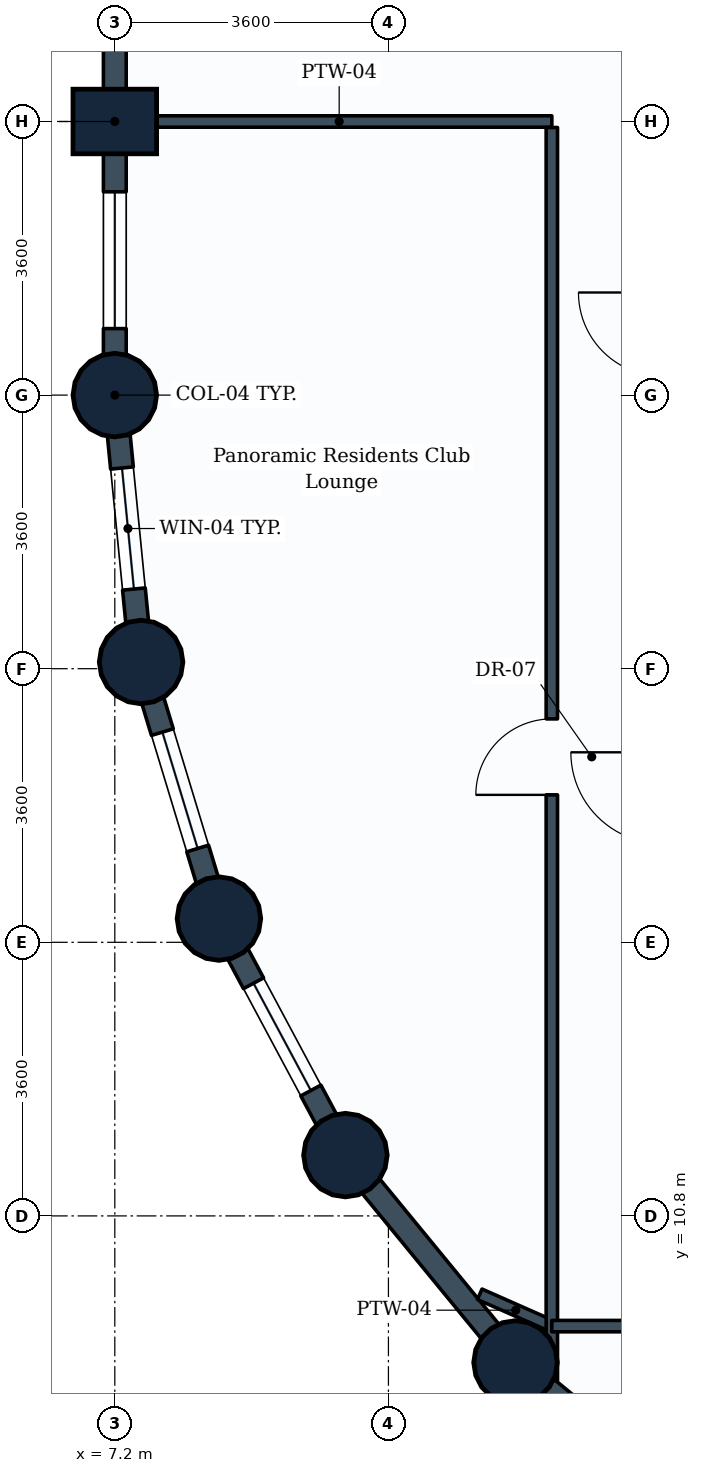
"""IFC4 building model, lengths in metres.
Left out: names, types, materials, properties, quantities, classifications, styles, units other than length and angle.
Written with IfcOpenShell. Run it as: python <this file> out.ifc"""

import sys

from ifc_helpers import new_model, si_unit, direction, frame, frame_2d, origin, origin_2d, place, context, subcontext, project, spatial, rectangle, circle, extrude, element, fill, save


model = new_model("IFC4")
c1 = context("Model", 3, precision=1e-05, world=origin(), true_north=direction((0.0, 1.0)))
c2 = subcontext(c1, "Body", "Model", "MODEL_VIEW")
j1 = project(units=[si_unit("LENGTHUNIT", "METRE"), si_unit("PLANEANGLEUNIT", "RADIAN")], contexts=[c1])
p1 = place(None, origin())
s1 = spatial("IfcSite", under=j1, at=p1, CompositionType="ELEMENT")
p2 = place(p1, origin())
s2 = spatial("IfcBuilding", under=s1, at=p2, CompositionType="ELEMENT")
p3 = place(p2, frame((0.0, 0.0, 80.1)))
s3 = spatial("IfcBuildingStorey", under=s2, at=p3, CompositionType="ELEMENT", Elevation=80.1)
p4 = place(p3, frame((7.2, 21.6, 0.0), z_axis=(0.0, 0.0, 1.0), x_axis=(1.0, 0.0, 0.0)))
e1 = element("IfcColumn", 1, at=p4, inside=s3, PredefinedType="COLUMN", context=c2, shape_type="SweptSolid", body=[
    extrude(circle(Radius=0.55, at=origin_2d()), origin(), (0.0, 0.0, 1.0), 3.9),
])
p5 = place(p3, frame((7.2, 25.2, 0.0), z_axis=(0.0, 0.0, 1.0), x_axis=(0.0, 1.0, 0.0)))
e2 = element("IfcColumn", 2, at=p5, inside=s3, PredefinedType="COLUMN", context=c2, shape_type="SweptSolid", body=[
    extrude(rectangle(XDim=0.85, YDim=1.1, at=origin_2d()), origin(), (0.0, 0.0, 1.0), 3.9),
])
for number, where, z_axis, x_axis in (
    (3, (7.546, 18.088, 0.0), (0.0, 0.0, 1.0), (1.0, 0.0, 0.0)),
    (4, (8.57, 14.712, 0.0), (0.0, 0.0, 1.0), (1.0, 0.0, 0.0)),
    (5, (10.234, 11.6, 0.0), (0.0, 0.0, 1.0), (1.0, 0.0, 0.0)),
    (6, (12.472, 8.872, 0.0), (0.0, 0.0, 1.0), (1.0, 0.0, 0.0)),
):
    element("IfcColumn", number, at=place(p3, frame(where, z_axis=z_axis, x_axis=x_axis)), inside=s3, PredefinedType="COLUMN", context=c2, shape_type="SweptSolid", body=[
        extrude(circle(Radius=0.55, at=origin_2d()), origin(), (0.0, 0.0, 1.0), 3.9),
    ])
p6 = place(p3, frame((7.2, 25.2, 0.0), z_axis=(0.0, 0.0, 1.0), x_axis=(0.0, 1.0, 0.0)))
e7 = element("IfcWall", 7, at=p6, inside=s3, PredefinedType="STANDARD", context=c2, shape_type="SweptSolid", body=[
    extrude(rectangle(XDim=3.6, YDim=0.3, at=frame_2d((1.8, 0.0))), origin(), (0.0, 0.0, 1.0), 2.93),
])
p7 = place(p3, frame((7.2, 21.6, 0.0), z_axis=(0.0, 0.0, 1.0), x_axis=(0.0, 1.0, 0.0)))
e8 = element("IfcWall", 8, at=p7, inside=s3, PredefinedType="STANDARD", context=c2, shape_type="SweptSolid", body=[
    extrude(rectangle(XDim=3.6, YDim=0.3, at=frame_2d((1.8, 0.0))), origin(), (0.0, 0.0, 1.0), 2.93),
])
p8 = place(p7, frame((0.875, 0.0, 0.85)))
e9 = element("IfcOpeningElement", 9, at=p8, cuts=e8, PredefinedType="OPENING", context=c2, shape_type="SweptSolid", body=[
    extrude(rectangle(XDim=1.8, YDim=1.35, at=frame_2d((0.9, 0.675))), frame((0.0, 0.16, 0.0), z_axis=(0.0, -1.0, 0.0), x_axis=(1.0, 0.0, 0.0)), (0.0, 0.0, 1.0), 0.32),
])
p9 = place(p3, frame((7.546, 18.088, 0.0), z_axis=(0.0, 0.0, 1.0), x_axis=(-0.09802417461, 0.995184033831, 0.0)))
e10 = element("IfcWall", 10, at=p9, inside=s3, PredefinedType="STANDARD", context=c2, shape_type="SweptSolid", body=[
    extrude(rectangle(XDim=3.529, YDim=0.3, at=frame_2d((1.765, 0.0))), origin(), (0.0, 0.0, 1.0), 2.93),
])
p10 = place(p9, frame((0.965, 0.0, 0.85)))
e11 = element("IfcOpeningElement", 11, at=p10, cuts=e10, PredefinedType="OPENING", context=c2, shape_type="SweptSolid", body=[
    extrude(rectangle(XDim=1.6, YDim=1.35, at=frame_2d((0.8, 0.675))), frame((0.0, 0.16, 0.0), z_axis=(0.0, -1.0, 0.0), x_axis=(1.0, 0.0, 0.0)), (0.0, 0.0, 1.0), 0.32),
])
p11 = place(p3, frame((8.57, 14.712, 0.0), z_axis=(0.0, 0.0, 1.0), x_axis=(-0.290305086481, 0.956934144423, 0.0)))
e12 = element("IfcWall", 12, at=p11, inside=s3, PredefinedType="STANDARD", context=c2, shape_type="SweptSolid", body=[
    extrude(rectangle(XDim=3.528, YDim=0.3, at=frame_2d((1.764, 0.0))), origin(), (0.0, 0.0, 1.0), 2.93),
])
p12 = place(p11, frame((0.964, 0.0, 0.85)))
e13 = element("IfcOpeningElement", 13, at=p12, cuts=e12, PredefinedType="OPENING", context=c2, shape_type="SweptSolid", body=[
    extrude(rectangle(XDim=1.6, YDim=1.35, at=frame_2d((0.8, 0.675))), frame((0.0, 0.16, 0.0), z_axis=(0.0, -1.0, 0.0), x_axis=(1.0, 0.0, 0.0)), (0.0, 0.0, 1.0), 0.32),
])
p13 = place(p3, frame((10.234, 11.6, 0.0), z_axis=(0.0, 0.0, 1.0), x_axis=(-0.47151087309, 0.881860247748, 0.0)))
e14 = element("IfcWall", 14, at=p13, inside=s3, PredefinedType="STANDARD", context=c2, shape_type="SweptSolid", body=[
    extrude(rectangle(XDim=3.529, YDim=0.3, at=frame_2d((1.764, 0.0))), origin(), (0.0, 0.0, 1.0), 2.93),
])
p14 = place(p13, frame((0.964, 0.0, 0.85)))
e15 = element("IfcOpeningElement", 15, at=p14, cuts=e14, PredefinedType="OPENING", context=c2, shape_type="SweptSolid", body=[
    extrude(rectangle(XDim=1.6, YDim=1.35, at=frame_2d((0.8, 0.675))), frame((0.0, 0.16, 0.0), z_axis=(0.0, -1.0, 0.0), x_axis=(1.0, 0.0, 0.0)), (0.0, 0.0, 1.0), 0.32),
])
p15 = place(p3, frame((12.472, 8.872, 0.0), z_axis=(0.0, 0.0, 1.0), x_axis=(-0.634258295121, 0.773121216285, 0.0)))
e16 = element("IfcWall", 16, at=p15, inside=s3, PredefinedType="STANDARD", context=c2, shape_type="SweptSolid", body=[
    extrude(rectangle(XDim=3.529, YDim=0.3, at=frame_2d((1.764, 0.0))), origin(), (0.0, 0.0, 1.0), 2.93),
])
p16 = place(p3, frame((15.2, 6.634, 0.0), z_axis=(0.0, 0.0, 1.0), x_axis=(-0.773121216285, 0.634258295121, 0.0)))
e17 = element("IfcWall", 17, at=p16, inside=s3, PredefinedType="STANDARD", context=c2, shape_type="SweptSolid", body=[
    extrude(rectangle(XDim=3.529, YDim=0.3, at=frame_2d((1.764, 0.0))), origin(), (0.0, 0.0, 1.0), 2.93),
])
p17 = place(p16, frame((0.964, 0.0, 0.85)))
e18 = element("IfcOpeningElement", 18, at=p17, cuts=e17, PredefinedType="OPENING", context=c2, shape_type="SweptSolid", body=[
    extrude(rectangle(XDim=1.6, YDim=1.35, at=frame_2d((0.8, 0.675))), frame((0.0, 0.16, 0.0), z_axis=(0.0, -1.0, 0.0), x_axis=(1.0, 0.0, 0.0)), (0.0, 0.0, 1.0), 0.32),
])
p18 = place(p3, frame((7.354, 25.2, 0.0), z_axis=(0.0, 0.0, 1.0), x_axis=(1.0, 0.0, 0.0)))
e19 = element("IfcWall", 19, at=p18, inside=s3, PredefinedType="PARTITIONING", context=c2, shape_type="SweptSolid", body=[
    extrude(rectangle(XDim=5.596, YDim=0.15, at=frame_2d((2.798, 0.0))), origin(), (0.0, 0.0, 1.0), 3.635),
])
p19 = place(p3, frame((12.95, 9.35, 0.0), z_axis=(0.0, 0.0, 1.0), x_axis=(-0.914692674918, 0.40415010881, 0.0)))
e20 = element("IfcWall", 20, at=p19, inside=s3, PredefinedType="PARTITIONING", context=c2, shape_type="SweptSolid", body=[
    extrude(rectangle(XDim=1.037, YDim=0.15, at=frame_2d((0.519, 0.0))), origin(), (0.0, 0.0, 1.0), 2.93),
])
p20 = place(p3, frame((12.95, 8.634, 0.0), z_axis=(0.0, 0.0, 1.0), x_axis=(0.0, 1.0, 0.0)))
e21 = element("IfcWall", 21, at=p20, inside=s3, PredefinedType="PARTITIONING", context=c2, shape_type="SweptSolid", body=[
    extrude(rectangle(XDim=16.487, YDim=0.15, at=frame_2d((8.244, 0.0))), origin(), (0.0, 0.0, 1.0), 2.93),
])
p21 = place(p20, frame((7.706, 0.0, 0.0)))
e22 = element("IfcOpeningElement", 22, at=p21, cuts=e21, PredefinedType="OPENING", context=c2, shape_type="SweptSolid", body=[
    extrude(rectangle(XDim=1.0, YDim=2.1, at=frame_2d((0.5, 1.05))), frame((0.0, 0.085, 0.0), z_axis=(0.0, -1.0, 0.0), x_axis=(1.0, 0.0, 0.0)), (0.0, 0.0, 1.0), 0.17),
])
p22 = place(p3, frame((12.95, 9.35, 0.0), z_axis=(0.0, 0.0, 1.0), x_axis=(1.0, 0.0, 0.0)))
e23 = element("IfcWall", 23, at=p22, inside=s3, PredefinedType="PARTITIONING", context=c2, shape_type="SweptSolid", body=[
    extrude(rectangle(XDim=15.771, YDim=0.15, at=frame_2d((7.885, 0.0))), origin(), (0.0, 0.0, 1.0), 3.18),
])
p23 = place(p22, frame((4.836, 0.0, 0.0)))
e24 = element("IfcOpeningElement", 24, at=p23, cuts=e23, PredefinedType="OPENING", context=c2, shape_type="SweptSolid", body=[
    extrude(rectangle(XDim=1.0, YDim=2.1, at=frame_2d((0.5, 1.05))), frame((0.0, 0.085, 0.0), z_axis=(0.0, -1.0, 0.0), x_axis=(1.0, 0.0, 0.0)), (0.0, 0.0, 1.0), 0.17),
])
p24 = place(p8, origin())
e25 = element("IfcWindow", 25, at=p24, inside=s3, PartitioningType="SINGLE_PANEL", PredefinedType="WINDOW", context=c2, shape_type="SweptSolid", body=[
    extrude(rectangle(XDim=1.8, YDim=1.35, at=frame_2d((0.9, 0.675))), frame((0.0, 0.03, 0.0), z_axis=(0.0, -1.0, 0.0), x_axis=(1.0, 0.0, 0.0)), (0.0, 0.0, 1.0), 0.06),
])
fill(e9, e25)
p25 = place(p10, origin())
e26 = element("IfcWindow", 26, at=p25, inside=s3, PartitioningType="SINGLE_PANEL", PredefinedType="WINDOW", context=c2, shape_type="SweptSolid", body=[
    extrude(rectangle(XDim=1.6, YDim=1.35, at=frame_2d((0.8, 0.675))), frame((0.0, 0.03, 0.0), z_axis=(0.0, -1.0, 0.0), x_axis=(1.0, 0.0, 0.0)), (0.0, 0.0, 1.0), 0.06),
])
fill(e11, e26)
p26 = place(p12, origin())
e27 = element("IfcWindow", 27, at=p26, inside=s3, PartitioningType="SINGLE_PANEL", PredefinedType="WINDOW", context=c2, shape_type="SweptSolid", body=[
    extrude(rectangle(XDim=1.6, YDim=1.35, at=frame_2d((0.8, 0.675))), frame((0.0, 0.03, 0.0), z_axis=(0.0, -1.0, 0.0), x_axis=(1.0, 0.0, 0.0)), (0.0, 0.0, 1.0), 0.06),
])
fill(e13, e27)
p27 = place(p14, origin())
e28 = element("IfcWindow", 28, at=p27, inside=s3, PartitioningType="SINGLE_PANEL", PredefinedType="WINDOW", context=c2, shape_type="SweptSolid", body=[
    extrude(rectangle(XDim=1.6, YDim=1.35, at=frame_2d((0.8, 0.675))), frame((0.0, 0.03, 0.0), z_axis=(0.0, -1.0, 0.0), x_axis=(1.0, 0.0, 0.0)), (0.0, 0.0, 1.0), 0.06),
])
fill(e15, e28)
p28 = place(p21, origin())
e29 = element("IfcDoor", 29, at=p28, inside=s3, OperationType="SINGLE_SWING_LEFT", PredefinedType="DOOR", context=c2, shape_type="SweptSolid", body=[
    extrude(rectangle(XDim=1.0, YDim=2.1, at=frame_2d((0.5, 1.05))), frame((0.0, 0.025, 0.0), z_axis=(0.0, -1.0, 0.0), x_axis=(1.0, 0.0, 0.0)), (0.0, 0.0, 1.0), 0.05),
])
fill(e22, e29)
save(model, sys.argv[1])
